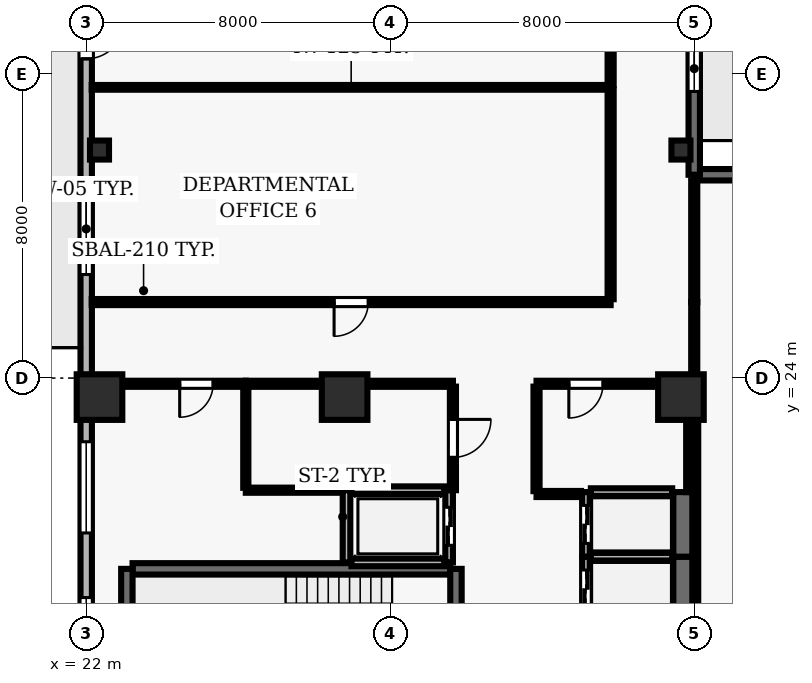
"""IFC4 building model, lengths in metres.
Left out: names, types, materials, properties, quantities, classifications, styles, units other than length and angle.
Written with IfcOpenShell. Run it as: python <this file> out.ifc"""

import sys

from ifc_helpers import new_model, si_unit, direction, frame, frame_2d, origin, origin_2d, place, context, subcontext, project, spatial, rectangle, hollow_rectangle, extrude, element, fill, save


model = new_model("IFC4")
c1 = context("Model", 3, precision=1e-05, world=origin(), true_north=direction((0.0, 1.0)))
c2 = subcontext(c1, "Body", "Model", "MODEL_VIEW")
j1 = project(units=[si_unit("LENGTHUNIT", "METRE"), si_unit("PLANEANGLEUNIT", "RADIAN")], contexts=[c1])
p1 = place(None, origin())
s1 = spatial("IfcSite", under=j1, at=p1, CompositionType="ELEMENT")
p2 = place(p1, origin())
s2 = spatial("IfcBuilding", under=s1, at=p2, CompositionType="ELEMENT")
p3 = place(p2, frame((0.0, 0.0, 119.0)))
s3 = spatial("IfcBuildingStorey", under=s2, at=p3, CompositionType="ELEMENT", Elevation=119.0)
for number, where, z_axis, x_axis in (
    (1, (22.35, 23.5, 0.0), (0.0, 0.0, 1.0), (1.0, 0.0, 0.0)),
    (2, (28.8, 23.5, 0.0), (0.0, 0.0, 1.0), (1.0, 0.0, 0.0)),
    (3, (37.65, 23.5, 0.0), (0.0, 0.0, 1.0), (1.0, 0.0, 0.0)),
):
    element("IfcColumn", number, at=place(p3, frame(where, z_axis=z_axis, x_axis=x_axis)), inside=s3, PredefinedType="COLUMN", context=c2, shape_type="SweptSolid", body=[
        extrude(rectangle(XDim=1.2, YDim=1.2, at=origin_2d()), origin(), (0.0, 0.0, 1.0), 3.9),
    ])
for number, where, z_axis, x_axis in (
    (4, (22.35, 30.0, 0.0), (0.0, 0.0, 1.0), (1.0, 0.0, 0.0)),
    (5, (37.65, 30.0, 0.0), (0.0, 0.0, 1.0), (1.0, 0.0, 0.0)),
):
    element("IfcColumn", number, at=place(p3, frame(where, z_axis=z_axis, x_axis=x_axis)), inside=s3, PredefinedType="COLUMN", context=c2, shape_type="SweptSolid", body=[
        extrude(hollow_rectangle(XDim=0.5, YDim=0.5, WallThickness=0.025, at=origin_2d()), origin(), (0.0, 0.0, 1.0), 3.9),
    ])
p4 = place(p3, frame((46.804, 29.35, 0.0), z_axis=(0.0, 0.0, 1.0), x_axis=(-1.0, 0.0, 0.0)))
e6 = element("IfcWall", 6, at=p4, inside=s3, PredefinedType="SOLIDWALL", context=c2, shape_type="SweptSolid", body=[
    extrude(rectangle(XDim=8.804, YDim=0.3, at=frame_2d((4.402, 0.0))), origin(), (0.0, 0.0, 1.0), 3.69),
])
p5 = place(p4, frame((2.902, 0.0, 0.9)))
e7 = element("IfcOpeningElement", 7, at=p5, cuts=e6, PredefinedType="OPENING", context=c2, shape_type="SweptSolid", body=[
    extrude(rectangle(XDim=3.0, YDim=2.2, at=frame_2d((1.5, 1.1))), frame((0.0, 0.16, 0.0), z_axis=(0.0, -1.0, 0.0), x_axis=(1.0, 0.0, 0.0)), (0.0, 0.0, 1.0), 0.32),
])
p6 = place(p3, frame((38.0, 29.35, 0.0), z_axis=(0.0, 0.0, 1.0), x_axis=(0.0, 1.0, 0.0)))
e8 = element("IfcWall", 8, at=p6, inside=s3, PredefinedType="SOLIDWALL", context=c2, shape_type="SweptSolid", body=[
    extrude(rectangle(XDim=16.75, YDim=0.3, at=frame_2d((8.375, 0.0))), origin(), (0.0, 0.0, 1.0), 3.69),
])
p7 = place(p6, frame((7.975, 0.0, 0.0)))
e9 = element("IfcOpeningElement", 9, at=p7, cuts=e8, PredefinedType="OPENING", context=c2, shape_type="SweptSolid", body=[
    extrude(rectangle(XDim=1.0, YDim=2.2, at=frame_2d((0.5, 1.1))), frame((0.0, 0.16, 0.0), z_axis=(0.0, -1.0, 0.0), x_axis=(1.0, 0.0, 0.0)), (0.0, 0.0, 1.0), 0.32),
])
p8 = place(p6, frame((2.192, 0.0, 0.9)))
e10 = element("IfcOpeningElement", 10, at=p8, cuts=e8, PredefinedType="OPENING", context=c2, shape_type="SweptSolid", body=[
    extrude(rectangle(XDim=1.2, YDim=1.6, at=frame_2d((0.6, 0.8))), frame((0.0, 0.16, 0.0), z_axis=(0.0, -1.0, 0.0), x_axis=(1.0, 0.0, 0.0)), (0.0, 0.0, 1.0), 0.32),
])
p9 = place(p6, frame((13.358, 0.0, 0.9)))
e11 = element("IfcOpeningElement", 11, at=p9, cuts=e8, PredefinedType="OPENING", context=c2, shape_type="SweptSolid", body=[
    extrude(rectangle(XDim=1.2, YDim=1.6, at=frame_2d((0.6, 0.8))), frame((0.0, 0.16, 0.0), z_axis=(0.0, -1.0, 0.0), x_axis=(1.0, 0.0, 0.0)), (0.0, 0.0, 1.0), 0.32),
])
p10 = place(p3, frame((22.0, 46.1, 0.0), z_axis=(0.0, 0.0, 1.0), x_axis=(0.0, -1.0, 0.0)))
e12 = element("IfcWall", 12, at=p10, inside=s3, PredefinedType="SOLIDWALL", context=c2, shape_type="SweptSolid", body=[
    extrude(rectangle(XDim=43.6, YDim=0.3, at=frame_2d((21.8, 0.0))), origin(), (0.0, 0.0, 1.0), 3.69),
])
p11 = place(p10, frame((12.7, 0.0, 0.0)))
e13 = element("IfcOpeningElement", 13, at=p11, cuts=e12, PredefinedType="OPENING", context=c2, shape_type="SweptSolid", body=[
    extrude(rectangle(XDim=1.0, YDim=2.2, at=frame_2d((0.5, 1.1))), frame((0.0, 0.16, 0.0), z_axis=(0.0, -1.0, 0.0), x_axis=(1.0, 0.0, 0.0)), (0.0, 0.0, 1.0), 0.32),
])
p12 = place(p10, frame((16.975, 0.0, 0.9)))
e14 = element("IfcOpeningElement", 14, at=p12, cuts=e12, PredefinedType="OPENING", context=c2, shape_type="SweptSolid", body=[
    extrude(rectangle(XDim=2.4, YDim=1.6, at=frame_2d((1.2, 0.8))), frame((0.0, 0.16, 0.0), z_axis=(0.0, -1.0, 0.0), x_axis=(1.0, 0.0, 0.0)), (0.0, 0.0, 1.0), 0.32),
])
p13 = place(p10, frame((23.775, 0.0, 0.9)))
e15 = element("IfcOpeningElement", 15, at=p13, cuts=e12, PredefinedType="OPENING", context=c2, shape_type="SweptSolid", body=[
    extrude(rectangle(XDim=2.4, YDim=1.6, at=frame_2d((1.2, 0.8))), frame((0.0, 0.16, 0.0), z_axis=(0.0, -1.0, 0.0), x_axis=(1.0, 0.0, 0.0)), (0.0, 0.0, 1.0), 0.32),
])
p14 = place(p10, frame((27.875, 0.0, 0.9)))
e16 = element("IfcOpeningElement", 16, at=p14, cuts=e12, PredefinedType="OPENING", context=c2, shape_type="SweptSolid", body=[
    extrude(rectangle(XDim=2.4, YDim=1.6, at=frame_2d((1.2, 0.8))), frame((0.0, 0.16, 0.0), z_axis=(0.0, -1.0, 0.0), x_axis=(1.0, 0.0, 0.0)), (0.0, 0.0, 1.0), 0.32),
])
p15 = place(p10, frame((34.225, 0.0, 0.9)))
e17 = element("IfcOpeningElement", 17, at=p15, cuts=e12, PredefinedType="OPENING", context=c2, shape_type="SweptSolid", body=[
    extrude(rectangle(XDim=2.4, YDim=1.6, at=frame_2d((1.2, 0.8))), frame((0.0, 0.16, 0.0), z_axis=(0.0, -1.0, 0.0), x_axis=(1.0, 0.0, 0.0)), (0.0, 0.0, 1.0), 0.32),
])
p16 = place(p3, frame((31.58, 18.98, 0.0), z_axis=(0.0, 0.0, 1.0), x_axis=(-1.0, 0.0, 0.0)))
e18 = element("IfcWall", 18, at=p16, inside=s3, PredefinedType="SHEAR", context=c2, shape_type="SweptSolid", body=[
    extrude(rectangle(XDim=8.36, YDim=0.3, at=frame_2d((4.18, 0.0))), origin(), (0.0, 0.0, 1.0), 3.69),
])
p17 = place(p3, frame((23.07, 18.98, 0.0), z_axis=(0.0, 0.0, 1.0), x_axis=(0.0, -1.0, 0.0)))
e19 = element("IfcWall", 19, at=p17, inside=s3, PredefinedType="SHEAR", context=c2, shape_type="SweptSolid", body=[
    extrude(rectangle(XDim=3.51, YDim=0.3, at=frame_2d((1.755, 0.0))), origin(), (0.0, 0.0, 1.0), 3.69),
])
p18 = place(p3, frame((31.73, 15.47, 0.0), z_axis=(0.0, 0.0, 1.0), x_axis=(0.0, 1.0, 0.0)))
e20 = element("IfcWall", 20, at=p18, inside=s3, PredefinedType="SHEAR", context=c2, shape_type="SweptSolid", body=[
    extrude(rectangle(XDim=3.51, YDim=0.3, at=frame_2d((1.755, 0.0))), origin(), (0.0, 0.0, 1.0), 3.69),
])
p19 = place(p18, frame((1.18, 0.0, 0.0)))
e21 = element("IfcOpeningElement", 21, at=p19, cuts=e20, PredefinedType="OPENING", context=c2, shape_type="SweptSolid", body=[
    extrude(rectangle(XDim=1.15, YDim=2.15, at=frame_2d((0.575, 1.075))), frame((0.0, 0.16, 0.0), z_axis=(0.0, -1.0, 0.0), x_axis=(1.0, 0.0, 0.0)), (0.0, 0.0, 1.0), 0.32),
])
p20 = place(p3, frame((35.15, 19.3, 0.0), z_axis=(0.0, 0.0, 1.0), x_axis=(0.0, -1.0, 0.0)))
e22 = element("IfcWall", 22, at=p20, inside=s3, PredefinedType="SOLIDWALL", context=c2, shape_type="SweptSolid", body=[
    extrude(rectangle(XDim=1.7, YDim=0.2, at=frame_2d((0.85, 0.0))), origin(), (0.0, 0.0, 1.0), 3.69),
])
p21 = place(p20, frame((0.35, 0.0, 0.0)))
e23 = element("IfcOpeningElement", 23, at=p21, cuts=e22, PredefinedType="OPENING", context=c2, shape_type="SweptSolid", body=[
    extrude(rectangle(XDim=1.0, YDim=2.1, at=frame_2d((0.5, 1.05))), frame((0.0, 0.11, 0.0), z_axis=(0.0, -1.0, 0.0), x_axis=(1.0, 0.0, 0.0)), (0.0, 0.0, 1.0), 0.22),
])
p22 = place(p3, frame((37.7, 17.6, 0.0), z_axis=(0.0, 0.0, 1.0), x_axis=(0.0, 1.0, 0.0)))
e24 = element("IfcWall", 24, at=p22, inside=s3, PredefinedType="SHEAR", context=c2, shape_type="SweptSolid", body=[
    extrude(rectangle(XDim=1.7, YDim=0.5, at=frame_2d((0.85, 0.0))), origin(), (0.0, 0.0, 1.0), 3.69),
])
p23 = place(p3, frame((37.42, 19.3, 0.0), z_axis=(0.0, 0.0, 1.0), x_axis=(-1.0, 0.0, 0.0)))
e25 = element("IfcWall", 25, at=p23, inside=s3, PredefinedType="SOLIDWALL", context=c2, shape_type="SweptSolid", body=[
    extrude(rectangle(XDim=2.14, YDim=0.2, at=frame_2d((1.07, 0.0))), origin(), (0.0, 0.0, 1.0), 3.69),
])
p24 = place(p3, frame((35.15, 21.0, 0.0), z_axis=(0.0, 0.0, 1.0), x_axis=(0.0, -1.0, 0.0)))
e26 = element("IfcWall", 26, at=p24, inside=s3, PredefinedType="SOLIDWALL", context=c2, shape_type="SweptSolid", body=[
    extrude(rectangle(XDim=1.7, YDim=0.2, at=frame_2d((0.85, 0.0))), origin(), (0.0, 0.0, 1.0), 3.69),
])
p25 = place(p24, frame((0.35, 0.0, 0.0)))
e27 = element("IfcOpeningElement", 27, at=p25, cuts=e26, PredefinedType="OPENING", context=c2, shape_type="SweptSolid", body=[
    extrude(rectangle(XDim=1.0, YDim=2.1, at=frame_2d((0.5, 1.05))), frame((0.0, 0.11, 0.0), z_axis=(0.0, -1.0, 0.0), x_axis=(1.0, 0.0, 0.0)), (0.0, 0.0, 1.0), 0.22),
])
p26 = place(p3, frame((37.7, 19.3, 0.0), z_axis=(0.0, 0.0, 1.0), x_axis=(0.0, 1.0, 0.0)))
e28 = element("IfcWall", 28, at=p26, inside=s3, PredefinedType="SHEAR", context=c2, shape_type="SweptSolid", body=[
    extrude(rectangle(XDim=1.7, YDim=0.5, at=frame_2d((0.85, 0.0))), origin(), (0.0, 0.0, 1.0), 3.69),
])
p27 = place(p3, frame((37.42, 21.0, 0.0), z_axis=(0.0, 0.0, 1.0), x_axis=(-1.0, 0.0, 0.0)))
e29 = element("IfcWall", 29, at=p27, inside=s3, PredefinedType="SOLIDWALL", context=c2, shape_type="SweptSolid", body=[
    extrude(rectangle(XDim=2.14, YDim=0.2, at=frame_2d((1.07, 0.0))), origin(), (0.0, 0.0, 1.0), 3.69),
])
p28 = place(p3, frame((28.85, 21.05, 0.0), z_axis=(0.0, 0.0, 1.0), x_axis=(0.0, -1.0, 0.0)))
e30 = element("IfcWall", 30, at=p28, inside=s3, PredefinedType="SOLIDWALL", context=c2, shape_type="SweptSolid", body=[
    extrude(rectangle(XDim=1.9, YDim=0.2, at=frame_2d((0.95, 0.0))), origin(), (0.0, 0.0, 1.0), 3.69),
])
p29 = place(p3, frame((31.55, 19.15, 0.0), z_axis=(0.0, 0.0, 1.0), x_axis=(0.0, 1.0, 0.0)))
e31 = element("IfcWall", 31, at=p29, inside=s3, PredefinedType="SOLIDWALL", context=c2, shape_type="SweptSolid", body=[
    extrude(rectangle(XDim=1.9, YDim=0.2, at=frame_2d((0.95, 0.0))), origin(), (0.0, 0.0, 1.0), 3.69),
])
p30 = place(p29, frame((0.45, 0.0, 0.0)))
e32 = element("IfcOpeningElement", 32, at=p30, cuts=e31, PredefinedType="OPENING", context=c2, shape_type="SweptSolid", body=[
    extrude(rectangle(XDim=1.0, YDim=2.1, at=frame_2d((0.5, 1.05))), frame((0.0, 0.11, 0.0), z_axis=(0.0, -1.0, 0.0), x_axis=(1.0, 0.0, 0.0)), (0.0, 0.0, 1.0), 0.22),
])
for number, where, z_axis, x_axis in (
    (33, (28.98, 19.15, 0.0), (0.0, 0.0, 1.0), (1.0, 0.0, 0.0)),
    (34, (31.42, 21.05, 0.0), (0.0, 0.0, 1.0), (-1.0, 0.0, 0.0)),
):
    element("IfcWall", number, at=place(p3, frame(where, z_axis=z_axis, x_axis=x_axis)), inside=s3, PredefinedType="SOLIDWALL", context=c2, shape_type="SweptSolid", body=[
        extrude(rectangle(XDim=2.44, YDim=0.2, at=frame_2d((1.22, 0.0))), origin(), (0.0, 0.0, 1.0), 3.69),
    ])
p31 = place(p3, frame((26.2, 21.05, 0.0), z_axis=(0.0, 0.0, 1.0), x_axis=(1.0, 0.0, 0.0)))
e35 = element("IfcWall", 35, at=p31, inside=s3, PredefinedType="PARTITIONING", context=c2, shape_type="SweptSolid", body=[
    extrude(rectangle(XDim=2.52, YDim=0.135, at=frame_2d((1.26, 0.0))), origin(), (0.0, 0.0, 1.0), 3.69),
])
p32 = place(p3, frame((26.2, 23.85, 0.0), z_axis=(0.0, 0.0, 1.0), x_axis=(-1.0, 0.0, 0.0)))
e36 = element("IfcWall", 36, at=p32, inside=s3, PredefinedType="PARTITIONING", context=c2, shape_type="SweptSolid", body=[
    extrude(rectangle(XDim=4.0, YDim=0.16, at=frame_2d((2.0, 0.0))), origin(), (0.0, 0.0, 1.0), 3.074),
])
p33 = place(p32, frame((0.86, 0.0, 0.0)))
e37 = element("IfcOpeningElement", 37, at=p33, cuts=e36, PredefinedType="OPENING", context=c2, shape_type="SweptSolid", body=[
    extrude(rectangle(XDim=0.88, YDim=2.1, at=frame_2d((0.44, 1.05))), frame((0.0, 0.09, 0.0), z_axis=(0.0, -1.0, 0.0), x_axis=(1.0, 0.0, 0.0)), (0.0, 0.0, 1.0), 0.18),
])
p34 = place(p3, frame((31.65, 23.85, 0.0), z_axis=(0.0, 0.0, 1.0), x_axis=(-1.0, 0.0, 0.0)))
e38 = element("IfcWall", 38, at=p34, inside=s3, PredefinedType="PARTITIONING", context=c2, shape_type="SweptSolid", body=[
    extrude(rectangle(XDim=5.45, YDim=0.16, at=frame_2d((2.725, 0.0))), origin(), (0.0, 0.0, 1.0), 3.074),
])
p35 = place(p3, frame((35.02, 20.95, 0.0), z_axis=(0.0, 0.0, 1.0), x_axis=(-1.0, 0.0, 0.0)))
e39 = element("IfcWall", 39, at=p35, inside=s3, PredefinedType="PARTITIONING", context=c2, shape_type="SweptSolid", body=[
    extrude(rectangle(XDim=1.17, YDim=0.16, at=frame_2d((0.585, 0.0))), origin(), (0.0, 0.0, 1.0), 3.69),
])
p36 = place(p3, frame((35.8, 26.0, 0.0), z_axis=(0.0, 0.0, 1.0), x_axis=(-1.0, 0.0, 0.0)))
e40 = element("IfcWall", 40, at=p36, inside=s3, PredefinedType="PARTITIONING", context=c2, shape_type="SweptSolid", body=[
    extrude(rectangle(XDim=13.655, YDim=0.16, at=frame_2d((6.828, 0.0))), origin(), (0.0, 0.0, 1.0), 3.69),
])
p37 = place(p36, frame((6.377, 0.0, 0.0)))
e41 = element("IfcOpeningElement", 41, at=p37, cuts=e40, PredefinedType="OPENING", context=c2, shape_type="SweptSolid", body=[
    extrude(rectangle(XDim=0.9, YDim=2.1, at=frame_2d((0.45, 1.05))), frame((0.0, 0.09, 0.0), z_axis=(0.0, -1.0, 0.0), x_axis=(1.0, 0.0, 0.0)), (0.0, 0.0, 1.0), 0.18),
])
p38 = place(p3, frame((35.8, 31.65, 0.0), z_axis=(0.0, 0.0, 1.0), x_axis=(-1.0, 0.0, 0.0)))
e42 = element("IfcWall", 42, at=p38, inside=s3, PredefinedType="PARTITIONING", context=c2, shape_type="SweptSolid", body=[
    extrude(rectangle(XDim=13.655, YDim=0.125, at=frame_2d((6.828, 0.0))), origin(), (0.0, 0.0, 1.0), 3.69),
])
p39 = place(p3, frame((37.85, 23.85, 0.0), z_axis=(0.0, 0.0, 1.0), x_axis=(-1.0, 0.0, 0.0)))
e43 = element("IfcWall", 43, at=p39, inside=s3, PredefinedType="PARTITIONING", context=c2, shape_type="SweptSolid", body=[
    extrude(rectangle(XDim=4.0, YDim=0.16, at=frame_2d((2.0, 0.0))), origin(), (0.0, 0.0, 1.0), 3.074),
])
p40 = place(p39, frame((2.25, 0.0, 0.0)))
e44 = element("IfcOpeningElement", 44, at=p40, cuts=e43, PredefinedType="OPENING", context=c2, shape_type="SweptSolid", body=[
    extrude(rectangle(XDim=0.9, YDim=2.1, at=frame_2d((0.45, 1.05))), frame((0.0, 0.09, 0.0), z_axis=(0.0, -1.0, 0.0), x_axis=(1.0, 0.0, 0.0)), (0.0, 0.0, 1.0), 0.18),
])
p41 = place(p3, frame((26.2, 23.775, 0.0), z_axis=(0.0, 0.0, 1.0), x_axis=(0.0, -1.0, 0.0)))
e45 = element("IfcWall", 45, at=p41, inside=s3, PredefinedType="PARTITIONING", context=c2, shape_type="SweptSolid", body=[
    extrude(rectangle(XDim=2.662, YDim=0.135, at=frame_2d((1.331, 0.0))), origin(), (0.0, 0.0, 1.0), 3.69),
])
p42 = place(p3, frame((31.65, 23.775, 0.0), z_axis=(0.0, 0.0, 1.0), x_axis=(0.0, -1.0, 0.0)))
e46 = element("IfcWall", 46, at=p42, inside=s3, PredefinedType="PARTITIONING", context=c2, shape_type="SweptSolid", body=[
    extrude(rectangle(XDim=2.725, YDim=0.16, at=frame_2d((1.362, 0.0))), origin(), (0.0, 0.0, 1.0), 3.69),
])
p43 = place(p42, frame((0.862, 0.0, 0.0)))
e47 = element("IfcOpeningElement", 47, at=p43, cuts=e46, PredefinedType="OPENING", context=c2, shape_type="SweptSolid", body=[
    extrude(rectangle(XDim=1.0, YDim=2.1, at=frame_2d((0.5, 1.05))), frame((0.0, 0.09, 0.0), z_axis=(0.0, -1.0, 0.0), x_axis=(1.0, 0.0, 0.0)), (0.0, 0.0, 1.0), 0.18),
])
p44 = place(p3, frame((33.85, 21.025, 0.0), z_axis=(0.0, 0.0, 1.0), x_axis=(0.0, 1.0, 0.0)))
e48 = element("IfcWall", 48, at=p44, inside=s3, PredefinedType="PARTITIONING", context=c2, shape_type="SweptSolid", body=[
    extrude(rectangle(XDim=2.75, YDim=0.16, at=frame_2d((1.375, 0.0))), origin(), (0.0, 0.0, 1.0), 3.69),
])
p45 = place(p3, frame((35.8, 31.592, 0.0), z_axis=(0.0, 0.0, 1.0), x_axis=(0.0, -1.0, 0.0)))
e49 = element("IfcWall", 49, at=p45, inside=s3, PredefinedType="PARTITIONING", context=c2, shape_type="SweptSolid", body=[
    extrude(rectangle(XDim=5.517, YDim=0.16, at=frame_2d((2.759, 0.0))), origin(), (0.0, 0.0, 1.0), 3.69),
])
p46 = place(p3, frame((35.8, 37.242, 0.0), z_axis=(0.0, 0.0, 1.0), x_axis=(0.0, -1.0, 0.0)))
e50 = element("IfcWall", 50, at=p46, inside=s3, PredefinedType="PARTITIONING", context=c2, shape_type="SweptSolid", body=[
    extrude(rectangle(XDim=5.535, YDim=0.16, at=frame_2d((2.768, 0.0))), origin(), (0.0, 0.0, 1.0), 3.69),
])
p47 = place(p46, frame((2.317, 0.0, 0.0)))
e51 = element("IfcOpeningElement", 51, at=p47, cuts=e50, PredefinedType="OPENING", context=c2, shape_type="SweptSolid", body=[
    extrude(rectangle(XDim=0.9, YDim=2.1, at=frame_2d((0.45, 1.05))), frame((0.0, 0.09, 0.0), z_axis=(0.0, -1.0, 0.0), x_axis=(1.0, 0.0, 0.0)), (0.0, 0.0, 1.0), 0.18),
])
p48 = place(p3, frame((37.85, 21.0, 0.0), z_axis=(0.0, 0.0, 1.0), x_axis=(0.0, 1.0, 0.0)))
e52 = element("IfcWall", 52, at=p48, inside=s3, PredefinedType="PARTITIONING", context=c2, shape_type="SweptSolid", body=[
    extrude(rectangle(XDim=2.775, YDim=0.125, at=frame_2d((1.387, 0.0))), origin(), (0.0, 0.0, 1.0), 3.074),
])
p49 = place(p3, frame((38.0, 23.85, 0.0), z_axis=(0.0, 0.0, 1.0), x_axis=(0.0, 1.0, 0.0)))
e53 = element("IfcWall", 53, at=p49, inside=s3, PredefinedType="PARTITIONING", context=c2, shape_type="SweptSolid", body=[
    extrude(rectangle(XDim=2.15, YDim=0.16, at=frame_2d((1.075, 0.0))), origin(), (0.0, 0.0, 1.0), 3.074),
])
p50 = place(p3, frame((38.0, 26.0, 0.0), z_axis=(0.0, 0.0, 1.0), x_axis=(0.0, 1.0, 0.0)))
e54 = element("IfcWall", 54, at=p50, inside=s3, PredefinedType="PARTITIONING", context=c2, shape_type="SweptSolid", body=[
    extrude(rectangle(XDim=3.205, YDim=0.16, at=frame_2d((1.603, 0.0))), origin(), (0.0, 0.0, 1.0), 3.074),
])
p51 = place(p3, frame((38.05, 23.85, 0.0), z_axis=(0.0, 0.0, 1.0), x_axis=(0.0, -1.0, 0.0)))
e55 = element("IfcWall", 55, at=p51, inside=s3, PredefinedType="MOVABLE", context=c2, shape_type="SweptSolid", body=[
    extrude(rectangle(XDim=7.775, YDim=0.11, at=frame_2d((3.888, 0.0))), origin(), (0.0, 0.0, 1.0), 3.074),
])
p52 = place(p8, origin())
e56 = element("IfcWindow", 56, at=p52, inside=s3, PartitioningType="SINGLE_PANEL", PredefinedType="WINDOW", context=c2, shape_type="SweptSolid", body=[
    extrude(rectangle(XDim=1.2, YDim=1.6, at=frame_2d((0.6, 0.8))), frame((0.0, 0.03, 0.0), z_axis=(0.0, -1.0, 0.0), x_axis=(1.0, 0.0, 0.0)), (0.0, 0.0, 1.0), 0.06),
])
fill(e10, e56)
p53 = place(p11, origin())
e57 = element("IfcDoor", 57, at=p53, inside=s3, OperationType="SINGLE_SWING_LEFT", PredefinedType="DOOR", context=c2, shape_type="SweptSolid", body=[
    extrude(rectangle(XDim=1.0, YDim=2.2, at=frame_2d((0.5, 1.1))), frame((0.0, 0.025, 0.0), z_axis=(0.0, -1.0, 0.0), x_axis=(1.0, 0.0, 0.0)), (0.0, 0.0, 1.0), 0.05),
])
fill(e13, e57)
p54 = place(p12, origin())
e58 = element("IfcWindow", 58, at=p54, inside=s3, PartitioningType="SINGLE_PANEL", PredefinedType="WINDOW", context=c2, shape_type="SweptSolid", body=[
    extrude(rectangle(XDim=2.4, YDim=1.6, at=frame_2d((1.2, 0.8))), frame((0.0, 0.03, 0.0), z_axis=(0.0, -1.0, 0.0), x_axis=(1.0, 0.0, 0.0)), (0.0, 0.0, 1.0), 0.06),
])
fill(e14, e58)
p55 = place(p13, origin())
e59 = element("IfcWindow", 59, at=p55, inside=s3, PartitioningType="SINGLE_PANEL", PredefinedType="WINDOW", context=c2, shape_type="SweptSolid", body=[
    extrude(rectangle(XDim=2.4, YDim=1.6, at=frame_2d((1.2, 0.8))), frame((0.0, 0.03, 0.0), z_axis=(0.0, -1.0, 0.0), x_axis=(1.0, 0.0, 0.0)), (0.0, 0.0, 1.0), 0.06),
])
fill(e15, e59)
p56 = place(p14, origin())
e60 = element("IfcWindow", 60, at=p56, inside=s3, PartitioningType="SINGLE_PANEL", PredefinedType="WINDOW", context=c2, shape_type="SweptSolid", body=[
    extrude(rectangle(XDim=2.4, YDim=1.6, at=frame_2d((1.2, 0.8))), frame((0.0, 0.03, 0.0), z_axis=(0.0, -1.0, 0.0), x_axis=(1.0, 0.0, 0.0)), (0.0, 0.0, 1.0), 0.06),
])
fill(e16, e60)
p57 = place(p21, origin())
e61 = element("IfcDoor", 61, at=p57, inside=s3, OperationType="DOUBLE_DOOR_SLIDING", PredefinedType="DOOR", context=c2, shape_type="SweptSolid", body=[
    extrude(rectangle(XDim=1.0, YDim=2.1, at=frame_2d((0.5, 1.05))), frame((0.0, 0.025, 0.0), z_axis=(0.0, -1.0, 0.0), x_axis=(1.0, 0.0, 0.0)), (0.0, 0.0, 1.0), 0.05),
])
fill(e23, e61)
p58 = place(p25, origin())
e62 = element("IfcDoor", 62, at=p58, inside=s3, OperationType="DOUBLE_DOOR_SLIDING", PredefinedType="DOOR", context=c2, shape_type="SweptSolid", body=[
    extrude(rectangle(XDim=1.0, YDim=2.1, at=frame_2d((0.5, 1.05))), frame((0.0, 0.025, 0.0), z_axis=(0.0, -1.0, 0.0), x_axis=(1.0, 0.0, 0.0)), (0.0, 0.0, 1.0), 0.05),
])
fill(e27, e62)
p59 = place(p30, origin())
e63 = element("IfcDoor", 63, at=p59, inside=s3, OperationType="DOUBLE_DOOR_SLIDING", PredefinedType="DOOR", context=c2, shape_type="SweptSolid", body=[
    extrude(rectangle(XDim=1.0, YDim=2.1, at=frame_2d((0.5, 1.05))), frame((0.0, 0.025, 0.0), z_axis=(0.0, -1.0, 0.0), x_axis=(1.0, 0.0, 0.0)), (0.0, 0.0, 1.0), 0.05),
])
fill(e32, e63)
p60 = place(p40, origin())
e64 = element("IfcDoor", 64, at=p60, inside=s3, OperationType="SINGLE_SWING_RIGHT", PredefinedType="DOOR", context=c2, shape_type="SweptSolid", body=[
    extrude(rectangle(XDim=0.9, YDim=2.1, at=frame_2d((0.45, 1.05))), frame((0.0, 0.025, 0.0), z_axis=(0.0, -1.0, 0.0), x_axis=(1.0, 0.0, 0.0)), (0.0, 0.0, 1.0), 0.05),
])
fill(e44, e64)
p61 = place(p43, origin())
e65 = element("IfcDoor", 65, at=p61, inside=s3, OperationType="SINGLE_SWING_LEFT", PredefinedType="DOOR", context=c2, shape_type="SweptSolid", body=[
    extrude(rectangle(XDim=1.0, YDim=2.1, at=frame_2d((0.5, 1.05))), frame((0.0, 0.025, 0.0), z_axis=(0.0, -1.0, 0.0), x_axis=(1.0, 0.0, 0.0)), (0.0, 0.0, 1.0), 0.05),
])
fill(e47, e65)
p62 = place(p33, origin())
e66 = element("IfcDoor", 66, at=p62, inside=s3, OperationType="SINGLE_SWING_RIGHT", PredefinedType="DOOR", context=c2, shape_type="SweptSolid", body=[
    extrude(rectangle(XDim=0.88, YDim=2.1, at=frame_2d((0.44, 1.05))), frame((0.0, 0.025, 0.0), z_axis=(0.0, -1.0, 0.0), x_axis=(1.0, 0.0, 0.0)), (0.0, 0.0, 1.0), 0.05),
])
fill(e37, e66)
p63 = place(p37, origin())
e67 = element("IfcDoor", 67, at=p63, inside=s3, OperationType="SINGLE_SWING_RIGHT", PredefinedType="DOOR", context=c2, shape_type="SweptSolid", body=[
    extrude(rectangle(XDim=0.9, YDim=2.1, at=frame_2d((0.45, 1.05))), frame((0.0, 0.025, 0.0), z_axis=(0.0, -1.0, 0.0), x_axis=(1.0, 0.0, 0.0)), (0.0, 0.0, 1.0), 0.05),
])
fill(e41, e67)
save(model, sys.argv[1])
